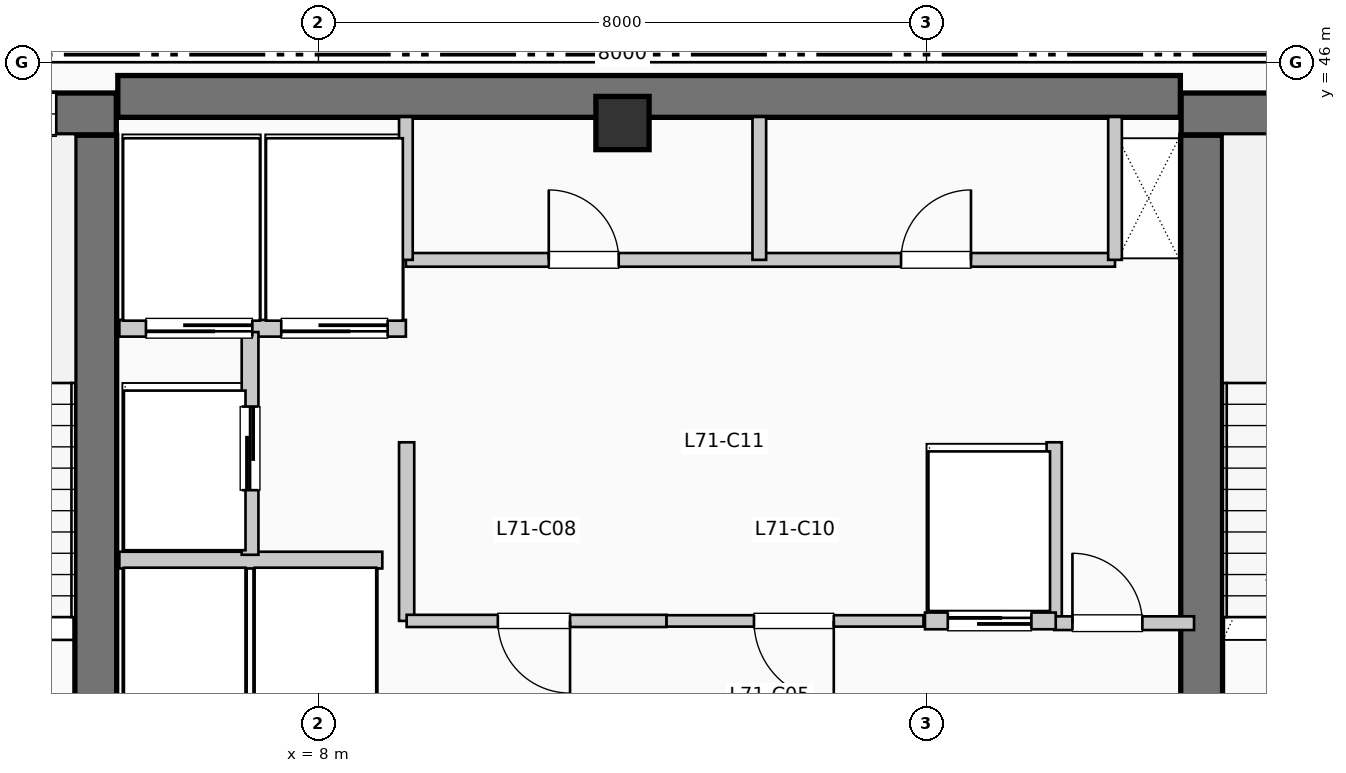
"""IFC4 building model, lengths in metres.
Left out: names, types, materials, properties, quantities, classifications, styles, units other than length and angle.
Written with IfcOpenShell. Run it as: python <this file> out.ifc"""

import sys

from ifc_helpers import new_model, si_unit, direction, frame, frame_2d, origin, origin_2d, place, context, subcontext, project, spatial, rectangle, extrude, element, fill, save


model = new_model("IFC4")
c1 = context("Model", 3, precision=1e-05, world=origin(), true_north=direction((0.0, 1.0)))
c2 = subcontext(c1, "Body", "Model", "MODEL_VIEW")
j1 = project(units=[si_unit("LENGTHUNIT", "METRE"), si_unit("PLANEANGLEUNIT", "RADIAN")], contexts=[c1])
p1 = place(None, origin())
s1 = spatial("IfcSite", under=j1, at=p1, CompositionType="ELEMENT")
p2 = place(p1, origin())
s2 = spatial("IfcBuilding", under=s1, at=p2, CompositionType="ELEMENT")
p3 = place(p2, frame((0.0, 0.0, 292.05)))
s3 = spatial("IfcBuildingStorey", under=s2, at=p3, CompositionType="ELEMENT", Elevation=292.05)
p4 = place(p3, frame((5.36, 45.55, 0.0), z_axis=(0.0, 0.0, 1.0), x_axis=(1.0, 0.0, 0.0)))
e1 = element("IfcWall", 1, at=p4, inside=s3, PredefinedType="SHEAR", context=c2, shape_type="SweptSolid", body=[
    extrude(rectangle(XDim=13.98, YDim=0.55, at=frame_2d((6.99, 0.0))), origin(), (0.0, 0.0, 1.0), 3.96),
])
p5 = place(p3, frame((5.07, 37.15, 0.0), z_axis=(0.0, 0.0, 1.0), x_axis=(0.0, 1.0, 0.0)))
e2 = element("IfcWall", 2, at=p5, inside=s3, PredefinedType="SHEAR", context=c2, shape_type="SweptSolid", body=[
    extrude(rectangle(XDim=7.89, YDim=0.55, at=frame_2d((3.945, 0.0))), origin(), (0.0, 0.0, 1.0), 3.96),
])
p6 = place(p3, frame((1.1, 45.32, 0.0), z_axis=(0.0, 0.0, 1.0), x_axis=(1.0, 0.0, 0.0)))
e3 = element("IfcWall", 3, at=p6, inside=s3, PredefinedType="SHEAR", context=c2, shape_type="SweptSolid", body=[
    extrude(rectangle(XDim=4.24, YDim=0.55, at=frame_2d((2.12, 0.0))), origin(), (0.0, 0.0, 1.0), 3.96),
])
p7 = place(p6, frame((2.05, 0.0, 1.05)))
e4 = element("IfcOpeningElement", 4, at=p7, cuts=e3, PredefinedType="OPENING", context=c2, shape_type="SweptSolid", body=[
    extrude(rectangle(XDim=1.4, YDim=1.8, at=frame_2d((0.7, 0.9))), frame((0.0, 0.285, 0.0), z_axis=(0.0, -1.0, 0.0), x_axis=(1.0, 0.0, 0.0)), (0.0, 0.0, 1.0), 0.57),
])
p8 = place(p3, frame((19.62, 37.15, 0.0), z_axis=(0.0, 0.0, 1.0), x_axis=(0.0, 1.0, 0.0)))
e5 = element("IfcWall", 5, at=p8, inside=s3, PredefinedType="SHEAR", context=c2, shape_type="SweptSolid", body=[
    extrude(rectangle(XDim=7.89, YDim=0.55, at=frame_2d((3.945, 0.0))), origin(), (0.0, 0.0, 1.0), 3.96),
])
p9 = place(p3, frame((19.35, 45.32, 0.0), z_axis=(0.0, 0.0, 1.0), x_axis=(1.0, 0.0, 0.0)))
e6 = element("IfcWall", 6, at=p9, inside=s3, PredefinedType="SHEAR", context=c2, shape_type="SweptSolid", body=[
    extrude(rectangle(XDim=3.69, YDim=0.55, at=frame_2d((1.845, 0.0))), origin(), (0.0, 0.0, 1.0), 3.96),
])
p10 = place(p9, frame((1.15, 0.0, 1.05)))
e7 = element("IfcOpeningElement", 7, at=p10, cuts=e6, PredefinedType="OPENING", context=c2, shape_type="SweptSolid", body=[
    extrude(rectangle(XDim=1.4, YDim=1.8, at=frame_2d((0.7, 0.9))), frame((0.0, 0.285, 0.0), z_axis=(0.0, -1.0, 0.0), x_axis=(1.0, 0.0, 0.0)), (0.0, 0.0, 1.0), 0.57),
])
p11 = place(p3, frame((12.0, 45.2, 0.0), z_axis=(0.0, 0.0, 1.0), x_axis=(1.0, 0.0, 0.0)))
e8 = element("IfcColumn", 8, at=p11, inside=s3, PredefinedType="COLUMN", context=c2, shape_type="SweptSolid", body=[
    extrude(rectangle(XDim=0.7, YDim=0.7, at=origin_2d()), origin(), (0.0, 0.0, 1.0), 3.96),
])
p12 = place(p3, frame((5.38, 39.45, 0.0), z_axis=(0.0, 0.0, 1.0), x_axis=(1.0, 0.0, 0.0)))
e9 = element("IfcWall", 9, at=p12, inside=s3, PredefinedType="PARTITIONING", context=c2, shape_type="SweptSolid", body=[
    extrude(rectangle(XDim=3.46, YDim=0.22, at=frame_2d((1.73, 0.0))), origin(), (0.0, 0.0, 1.0), 3.74),
])
p13 = place(p3, frame((5.38, 42.5, 0.0), z_axis=(0.0, 0.0, 1.0), x_axis=(1.0, 0.0, 0.0)))
e10 = element("IfcWall", 10, at=p13, inside=s3, PredefinedType="PARTITIONING", context=c2, shape_type="SweptSolid", body=[
    extrude(rectangle(XDim=3.77, YDim=0.22, at=frame_2d((1.885, 0.0))), origin(), (0.0, 0.0, 1.0), 3.74),
])
p14 = place(p13, frame((1.75, 0.0, 0.0), z_axis=(0.0, 0.0, 1.0), x_axis=(-1.0, 0.0, 0.0)))
e11 = element("IfcOpeningElement", 11, at=p14, cuts=e10, PredefinedType="OPENING", context=c2, shape_type="SweptSolid", body=[
    extrude(rectangle(XDim=1.4, YDim=2.2, at=frame_2d((0.7, 1.1))), frame((0.0, 0.12, 0.0), z_axis=(0.0, -1.0, 0.0), x_axis=(1.0, 0.0, 0.0)), (0.0, 0.0, 1.0), 0.24),
])
p15 = place(p13, frame((3.53, 0.0, 0.0), z_axis=(0.0, 0.0, 1.0), x_axis=(-1.0, 0.0, 0.0)))
e12 = element("IfcOpeningElement", 12, at=p15, cuts=e10, PredefinedType="OPENING", context=c2, shape_type="SweptSolid", body=[
    extrude(rectangle(XDim=1.4, YDim=2.2, at=frame_2d((0.7, 1.1))), frame((0.0, 0.12, 0.0), z_axis=(0.0, -1.0, 0.0), x_axis=(1.0, 0.0, 0.0)), (0.0, 0.0, 1.0), 0.24),
])
p16 = place(p3, frame((7.1, 39.52, 0.0), z_axis=(0.0, 0.0, 1.0), x_axis=(0.0, 1.0, 0.0)))
e13 = element("IfcWall", 13, at=p16, inside=s3, PredefinedType="PARTITIONING", context=c2, shape_type="SweptSolid", body=[
    extrude(rectangle(XDim=2.93, YDim=0.22, at=frame_2d((1.465, 0.0))), origin(), (0.0, 0.0, 1.0), 3.74),
])
p17 = place(p16, frame((0.85, 0.0, 0.0)))
e14 = element("IfcOpeningElement", 14, at=p17, cuts=e13, PredefinedType="OPENING", context=c2, shape_type="SweptSolid", body=[
    extrude(rectangle(XDim=1.1, YDim=2.2, at=frame_2d((0.55, 1.1))), frame((0.0, 0.12, 0.0), z_axis=(0.0, -1.0, 0.0), x_axis=(1.0, 0.0, 0.0)), (0.0, 0.0, 1.0), 0.24),
])
for number, where, z_axis, x_axis in (
    (15, (9.16, 38.65, 0.0), (0.0, 0.0, 1.0), (0.0, 1.0, 0.0)),
    (16, (17.68, 38.65, 0.0), (0.0, 0.0, 1.0), (0.0, 1.0, 0.0)),
):
    element("IfcWall", number, at=place(p3, frame(where, z_axis=z_axis, x_axis=x_axis)), inside=s3, PredefinedType="PARTITIONING", context=c2, shape_type="SweptSolid", body=[
        extrude(rectangle(XDim=2.35, YDim=0.2, at=frame_2d((1.175, 0.0))), origin(), (0.0, 0.0, 1.0), 3.74),
    ])
p18 = place(p3, frame((17.68, 38.62, 0.0), z_axis=(0.0, 0.0, 1.0), x_axis=(1.0, 0.0, 0.0)))
e17 = element("IfcWall", 17, at=p18, inside=s3, PredefinedType="PARTITIONING", context=c2, shape_type="SweptSolid", body=[
    extrude(rectangle(XDim=1.84, YDim=0.18, at=frame_2d((0.92, 0.0))), origin(), (0.0, 0.0, 1.0), 3.74),
])
p19 = place(p18, frame((0.24, 0.0, 0.0)))
e18 = element("IfcOpeningElement", 18, at=p19, cuts=e17, PredefinedType="OPENING", context=c2, shape_type="SweptSolid", body=[
    extrude(rectangle(XDim=0.92, YDim=2.1, at=frame_2d((0.46, 1.05))), frame((0.0, 0.1, 0.0), z_axis=(0.0, -1.0, 0.0), x_axis=(1.0, 0.0, 0.0)), (0.0, 0.0, 1.0), 0.2),
])
p20 = place(p3, frame((9.16, 38.65, 0.0), z_axis=(0.0, 0.0, 1.0), x_axis=(1.0, 0.0, 0.0)))
e19 = element("IfcWall", 19, at=p20, inside=s3, PredefinedType="PARTITIONING", context=c2, shape_type="SweptSolid", body=[
    extrude(rectangle(XDim=3.42, YDim=0.16, at=frame_2d((1.71, 0.0))), origin(), (0.0, 0.0, 1.0), 3.74),
])
p21 = place(p20, frame((2.15, 0.0, 0.0), z_axis=(0.0, 0.0, 1.0), x_axis=(-1.0, 0.0, 0.0)))
e20 = element("IfcOpeningElement", 20, at=p21, cuts=e19, PredefinedType="OPENING", context=c2, shape_type="SweptSolid", body=[
    extrude(rectangle(XDim=0.95, YDim=2.15, at=frame_2d((0.475, 1.075))), frame((0.0, 0.09, 0.0), z_axis=(0.0, -1.0, 0.0), x_axis=(1.0, 0.0, 0.0)), (0.0, 0.0, 1.0), 0.18),
])
p22 = place(p3, frame((12.58, 38.65, 0.0), z_axis=(0.0, 0.0, 1.0), x_axis=(1.0, 0.0, 0.0)))
e21 = element("IfcWall", 21, at=p22, inside=s3, PredefinedType="PARTITIONING", context=c2, shape_type="SweptSolid", body=[
    extrude(rectangle(XDim=3.38, YDim=0.15, at=frame_2d((1.69, 0.0))), origin(), (0.0, 0.0, 1.0), 3.74),
])
p23 = place(p22, frame((2.2, 0.0, 0.0), z_axis=(0.0, 0.0, 1.0), x_axis=(-1.0, 0.0, 0.0)))
e22 = element("IfcOpeningElement", 22, at=p23, cuts=e21, PredefinedType="OPENING", context=c2, shape_type="SweptSolid", body=[
    extrude(rectangle(XDim=1.05, YDim=2.15, at=frame_2d((0.525, 1.075))), frame((0.0, 0.085, 0.0), z_axis=(0.0, -1.0, 0.0), x_axis=(1.0, 0.0, 0.0)), (0.0, 0.0, 1.0), 0.17),
])
p24 = place(p3, frame((15.98, 38.65, 0.0), z_axis=(0.0, 0.0, 1.0), x_axis=(1.0, 0.0, 0.0)))
e23 = element("IfcWall", 23, at=p24, inside=s3, PredefinedType="PARTITIONING", context=c2, shape_type="SweptSolid", body=[
    extrude(rectangle(XDim=1.72, YDim=0.22, at=frame_2d((0.86, 0.0))), origin(), (0.0, 0.0, 1.0), 3.74),
])
p25 = place(p24, frame((0.3, 0.0, 0.0)))
e24 = element("IfcOpeningElement", 24, at=p25, cuts=e23, PredefinedType="OPENING", context=c2, shape_type="SweptSolid", body=[
    extrude(rectangle(XDim=1.1, YDim=2.2, at=frame_2d((0.55, 1.1))), frame((0.0, 0.12, 0.0), z_axis=(0.0, -1.0, 0.0), x_axis=(1.0, 0.0, 0.0)), (0.0, 0.0, 1.0), 0.24),
])
p26 = place(p3, frame((9.15, 43.4, 0.0), z_axis=(0.0, 0.0, 1.0), x_axis=(1.0, 0.0, 0.0)))
e25 = element("IfcWall", 25, at=p26, inside=s3, PredefinedType="PLUMBINGWALL", context=c2, shape_type="SweptSolid", body=[
    extrude(rectangle(XDim=9.33, YDim=0.18, at=frame_2d((4.665, 0.0))), origin(), (0.0, 0.0, 1.0), 3.74),
])
p27 = place(p26, frame((1.88, 0.0, 0.0)))
e26 = element("IfcOpeningElement", 26, at=p27, cuts=e25, PredefinedType="OPENING", context=c2, shape_type="SweptSolid", body=[
    extrude(rectangle(XDim=0.92, YDim=2.1, at=frame_2d((0.46, 1.05))), frame((0.0, 0.1, 0.0), z_axis=(0.0, -1.0, 0.0), x_axis=(1.0, 0.0, 0.0)), (0.0, 0.0, 1.0), 0.2),
])
p28 = place(p26, frame((6.515, 0.0, 0.0)))
e27 = element("IfcOpeningElement", 27, at=p28, cuts=e25, PredefinedType="OPENING", context=c2, shape_type="SweptSolid", body=[
    extrude(rectangle(XDim=0.92, YDim=2.1, at=frame_2d((0.46, 1.05))), frame((0.0, 0.1, 0.0), z_axis=(0.0, -1.0, 0.0), x_axis=(1.0, 0.0, 0.0)), (0.0, 0.0, 1.0), 0.2),
])
for number, where, z_axis, x_axis in (
    (28, (9.15, 43.4, 0.0), (0.0, 0.0, 1.0), (0.0, 1.0, 0.0)),
    (29, (18.48, 43.4, 0.0), (0.0, 0.0, 1.0), (0.0, 1.0, 0.0)),
    (30, (13.8, 43.4, 0.0), (0.0, 0.0, 1.0), (0.0, 1.0, 0.0)),
):
    element("IfcWall", number, at=place(p3, frame(where, z_axis=z_axis, x_axis=x_axis)), inside=s3, PredefinedType="PLUMBINGWALL", context=c2, shape_type="SweptSolid", body=[
        extrude(rectangle(XDim=1.88, YDim=0.18, at=frame_2d((0.94, 0.0))), origin(), (0.0, 0.0, 1.0), 3.74),
    ])
p29 = place(p7, origin())
e31 = element("IfcWindow", 31, at=p29, inside=s3, PartitioningType="SINGLE_PANEL", PredefinedType="WINDOW", context=c2, shape_type="SweptSolid", body=[
    extrude(rectangle(XDim=1.4, YDim=1.8, at=frame_2d((0.7, 0.9))), frame((0.0, 0.03, 0.0), z_axis=(0.0, -1.0, 0.0), x_axis=(1.0, 0.0, 0.0)), (0.0, 0.0, 1.0), 0.06),
])
fill(e4, e31)
p30 = place(p14, origin())
e32 = element("IfcDoor", 32, at=p30, inside=s3, OperationType="SLIDING_TO_LEFT", PredefinedType="DOOR", context=c2, shape_type="SweptSolid", body=[
    extrude(rectangle(XDim=1.4, YDim=2.2, at=frame_2d((0.7, 1.1))), frame((0.0, 0.025, 0.0), z_axis=(0.0, -1.0, 0.0), x_axis=(1.0, 0.0, 0.0)), (0.0, 0.0, 1.0), 0.05),
])
fill(e11, e32)
p31 = place(p15, origin())
e33 = element("IfcDoor", 33, at=p31, inside=s3, OperationType="SLIDING_TO_LEFT", PredefinedType="DOOR", context=c2, shape_type="SweptSolid", body=[
    extrude(rectangle(XDim=1.4, YDim=2.2, at=frame_2d((0.7, 1.1))), frame((0.0, 0.025, 0.0), z_axis=(0.0, -1.0, 0.0), x_axis=(1.0, 0.0, 0.0)), (0.0, 0.0, 1.0), 0.05),
])
fill(e12, e33)
p32 = place(p17, origin())
e34 = element("IfcDoor", 34, at=p32, inside=s3, OperationType="SLIDING_TO_LEFT", PredefinedType="DOOR", context=c2, shape_type="SweptSolid", body=[
    extrude(rectangle(XDim=1.1, YDim=2.2, at=frame_2d((0.55, 1.1))), frame((0.0, 0.025, 0.0), z_axis=(0.0, -1.0, 0.0), x_axis=(1.0, 0.0, 0.0)), (0.0, 0.0, 1.0), 0.05),
])
fill(e14, e34)
p33 = place(p19, origin())
e35 = element("IfcDoor", 35, at=p33, inside=s3, OperationType="SINGLE_SWING_LEFT", PredefinedType="DOOR", context=c2, shape_type="SweptSolid", body=[
    extrude(rectangle(XDim=0.92, YDim=2.1, at=frame_2d((0.46, 1.05))), frame((0.0, 0.025, 0.0), z_axis=(0.0, -1.0, 0.0), x_axis=(1.0, 0.0, 0.0)), (0.0, 0.0, 1.0), 0.05),
])
fill(e18, e35)
p34 = place(p21, origin())
e36 = element("IfcDoor", 36, at=p34, inside=s3, OperationType="SINGLE_SWING_RIGHT", PredefinedType="DOOR", context=c2, shape_type="SweptSolid", body=[
    extrude(rectangle(XDim=0.95, YDim=2.15, at=frame_2d((0.475, 1.075))), frame((0.0, 0.025, 0.0), z_axis=(0.0, -1.0, 0.0), x_axis=(1.0, 0.0, 0.0)), (0.0, 0.0, 1.0), 0.05),
])
fill(e20, e36)
p35 = place(p23, origin())
e37 = element("IfcDoor", 37, at=p35, inside=s3, OperationType="SINGLE_SWING_RIGHT", PredefinedType="DOOR", context=c2, shape_type="SweptSolid", body=[
    extrude(rectangle(XDim=1.05, YDim=2.15, at=frame_2d((0.525, 1.075))), frame((0.0, 0.025, 0.0), z_axis=(0.0, -1.0, 0.0), x_axis=(1.0, 0.0, 0.0)), (0.0, 0.0, 1.0), 0.05),
])
fill(e22, e37)
p36 = place(p25, origin())
e38 = element("IfcDoor", 38, at=p36, inside=s3, OperationType="SLIDING_TO_LEFT", PredefinedType="DOOR", context=c2, shape_type="SweptSolid", body=[
    extrude(rectangle(XDim=1.1, YDim=2.2, at=frame_2d((0.55, 1.1))), frame((0.0, 0.025, 0.0), z_axis=(0.0, -1.0, 0.0), x_axis=(1.0, 0.0, 0.0)), (0.0, 0.0, 1.0), 0.05),
])
fill(e24, e38)
p37 = place(p27, origin())
e39 = element("IfcDoor", 39, at=p37, inside=s3, OperationType="SINGLE_SWING_LEFT", PredefinedType="DOOR", context=c2, shape_type="SweptSolid", body=[
    extrude(rectangle(XDim=0.92, YDim=2.1, at=frame_2d((0.46, 1.05))), frame((0.0, 0.025, 0.0), z_axis=(0.0, -1.0, 0.0), x_axis=(1.0, 0.0, 0.0)), (0.0, 0.0, 1.0), 0.05),
])
fill(e26, e39)
p38 = place(p28, origin())
e40 = element("IfcDoor", 40, at=p38, inside=s3, OperationType="SINGLE_SWING_RIGHT", PredefinedType="DOOR", context=c2, shape_type="SweptSolid", body=[
    extrude(rectangle(XDim=0.92, YDim=2.1, at=frame_2d((0.46, 1.05))), frame((0.0, 0.025, 0.0), z_axis=(0.0, -1.0, 0.0), x_axis=(1.0, 0.0, 0.0)), (0.0, 0.0, 1.0), 0.05),
])
fill(e27, e40)
save(model, sys.argv[1])
